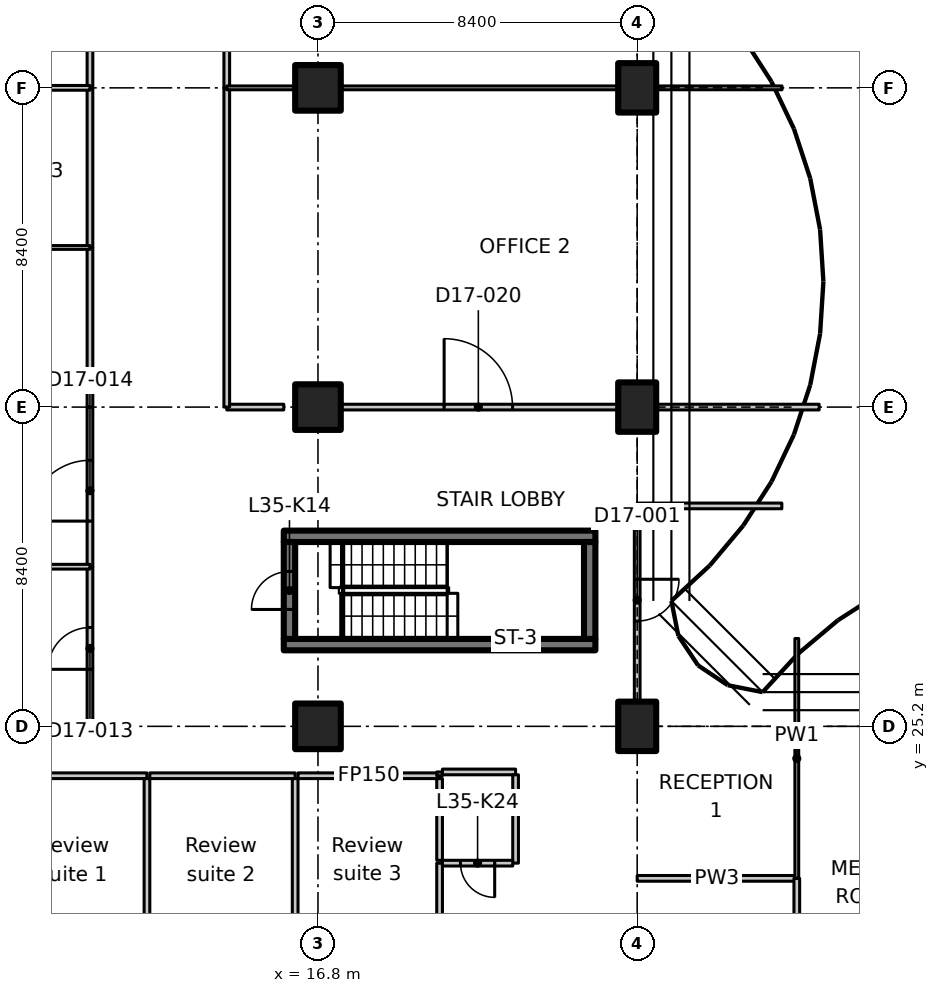
"""IFC4 building model, lengths in metres.
Left out: names, types, materials, properties, quantities, classifications, styles, units other than length and angle.
Written with IfcOpenShell. Run it as: python <this file> out.ifc"""

import sys

from ifc_helpers import new_model, si_unit, direction, frame, frame_2d, origin, origin_2d, place, context, subcontext, project, spatial, polyline, rectangle, outline, extrude, element, fill, save


model = new_model("IFC4")
c1 = context("Model", 3, precision=1e-05, world=origin(), true_north=direction((0.0, 1.0)))
c2 = subcontext(c1, "Body", "Model", "MODEL_VIEW")
j1 = project(units=[si_unit("LENGTHUNIT", "METRE"), si_unit("PLANEANGLEUNIT", "RADIAN")], contexts=[c1])
p1 = place(None, origin())
s1 = spatial("IfcSite", under=j1, at=p1, CompositionType="ELEMENT")
p2 = place(p1, origin())
s2 = spatial("IfcBuilding", under=s1, at=p2, CompositionType="ELEMENT")
p3 = place(p2, frame((0.0, 0.0, 142.1)))
s3 = spatial("IfcBuildingStorey", under=s2, at=p3, CompositionType="ELEMENT", Elevation=142.1)
for number, where, z_axis, x_axis in (
    (1, (16.8, 25.2, 0.0), (0.0, 0.0, 1.0), (1.0, 0.0, 0.0)),
    (2, (16.8, 33.6, 0.0), (0.0, 0.0, 1.0), (1.0, 0.0, 0.0)),
    (3, (16.8, 42.0, 0.0), (0.0, 0.0, 1.0), (1.0, 0.0, 0.0)),
):
    element("IfcColumn", number, at=place(p3, frame(where, z_axis=z_axis, x_axis=x_axis)), inside=s3, PredefinedType="COLUMN", context=c2, shape_type="SweptSolid", body=[
        extrude(rectangle(XDim=1.2, YDim=1.2, at=origin_2d()), origin(), (0.0, 0.0, 1.0), 3.35),
    ])
for number, where, z_axis, x_axis in (
    (4, (25.2, 25.2, 0.0), (0.0, 0.0, 1.0), (1.0, 0.0, 0.0)),
    (5, (25.2, 33.6, 0.0), (0.0, 0.0, 1.0), (1.0, 0.0, 0.0)),
    (6, (25.2, 42.0, 0.0), (0.0, 0.0, 1.0), (1.0, 0.0, 0.0)),
):
    element("IfcColumn", number, at=place(p3, frame(where, z_axis=z_axis, x_axis=x_axis)), inside=s3, PredefinedType="COLUMN", context=c2, shape_type="SweptSolid", body=[
        extrude(rectangle(XDim=1.0, YDim=1.3, at=origin_2d()), origin(), (0.0, 0.0, 1.0), 3.35),
    ])
for number, where, z_axis, x_axis in (
    (7, (15.9, 27.35, 0.0), (0.0, 0.0, 1.0), (1.0, 0.0, 0.0)),
    (8, (15.9, 30.2, 0.0), (0.0, 0.0, 1.0), (1.0, 0.0, 0.0)),
):
    element("IfcWall", number, at=place(p3, frame(where, z_axis=z_axis, x_axis=x_axis)), inside=s3, PredefinedType="SHEAR", context=c2, shape_type="SweptSolid", body=[
        extrude(rectangle(XDim=8.2, YDim=0.3, at=frame_2d((4.1, 0.0))), origin(), (0.0, 0.0, 1.0), 3.35),
    ])
p4 = place(p3, frame((16.05, 27.5, 0.0), z_axis=(0.0, 0.0, 1.0), x_axis=(0.0, 1.0, 0.0)))
e9 = element("IfcWall", 9, at=p4, inside=s3, PredefinedType="SHEAR", context=c2, shape_type="SweptSolid", body=[
    extrude(rectangle(XDim=2.55, YDim=0.3, at=frame_2d((1.275, 0.0))), origin(), (0.0, 0.0, 1.0), 3.35),
])
p5 = place(p4, frame((0.775, 0.0, 0.0)))
e10 = element("IfcOpeningElement", 10, at=p5, cuts=e9, PredefinedType="OPENING", context=c2, shape_type="SweptSolid", body=[
    extrude(rectangle(XDim=1.0, YDim=2.1, at=frame_2d((0.5, 1.05))), frame((0.0, 0.16, 0.0), z_axis=(0.0, -1.0, 0.0), x_axis=(1.0, 0.0, 0.0)), (0.0, 0.0, 1.0), 0.32),
])
p6 = place(p3, frame((23.95, 27.5, 0.0), z_axis=(0.0, 0.0, 1.0), x_axis=(0.0, 1.0, 0.0)))
e11 = element("IfcWall", 11, at=p6, inside=s3, PredefinedType="SHEAR", context=c2, shape_type="SweptSolid", body=[
    extrude(rectangle(XDim=2.55, YDim=0.3, at=frame_2d((1.275, 0.0))), origin(), (0.0, 0.0, 1.0), 3.35),
])
p7 = place(p3, frame((8.575, 23.9, 0.0), z_axis=(0.0, 0.0, 1.0), x_axis=(1.0, 0.0, 0.0)))
e12 = element("IfcWall", 12, at=p7, inside=s3, PredefinedType="PARTITIONING", context=c2, shape_type="SweptSolid", body=[
    extrude(rectangle(XDim=3.725, YDim=0.15, at=frame_2d((1.863, 0.0))), origin(), (0.0, 0.0, 1.0), 3.35),
])
p8 = place(p3, frame((12.3, 23.825, 0.0), z_axis=(0.0, 0.0, 1.0), x_axis=(0.0, -1.0, 0.0)))
e13 = element("IfcWall", 13, at=p8, inside=s3, PredefinedType="PARTITIONING", context=c2, shape_type="SweptSolid", body=[
    extrude(rectangle(XDim=4.35, YDim=0.15, at=frame_2d((2.175, 0.0))), origin(), (0.0, 0.0, 1.0), 3.35),
])
p9 = place(p3, frame((12.375, 23.9, 0.0), z_axis=(0.0, 0.0, 1.0), x_axis=(1.0, 0.0, 0.0)))
e14 = element("IfcWall", 14, at=p9, inside=s3, PredefinedType="PARTITIONING", context=c2, shape_type="SweptSolid", body=[
    extrude(rectangle(XDim=3.825, YDim=0.15, at=frame_2d((1.913, 0.0))), origin(), (0.0, 0.0, 1.0), 3.35),
])
p10 = place(p3, frame((20.0, 21.6, 0.0), z_axis=(0.0, 0.0, 1.0), x_axis=(0.0, -1.0, 0.0)))
e15 = element("IfcWall", 15, at=p10, inside=s3, PredefinedType="PARTITIONING", context=c2, shape_type="SweptSolid", body=[
    extrude(rectangle(XDim=2.2, YDim=0.15, at=frame_2d((1.1, 0.0))), origin(), (0.0, 0.0, 1.0), 3.35),
])
p11 = place(p3, frame((16.2, 23.825, 0.0), z_axis=(0.0, 0.0, 1.0), x_axis=(0.0, -1.0, 0.0)))
e16 = element("IfcWall", 16, at=p11, inside=s3, PredefinedType="PARTITIONING", context=c2, shape_type="SweptSolid", body=[
    extrude(rectangle(XDim=4.35, YDim=0.15, at=frame_2d((2.175, 0.0))), origin(), (0.0, 0.0, 1.0), 3.35),
])
p12 = place(p3, frame((16.275, 23.9, 0.0), z_axis=(0.0, 0.0, 1.0), x_axis=(1.0, 0.0, 0.0)))
e17 = element("IfcWall", 17, at=p12, inside=s3, PredefinedType="PARTITIONING", context=c2, shape_type="SweptSolid", body=[
    extrude(rectangle(XDim=3.725, YDim=0.15, at=frame_2d((1.863, 0.0))), origin(), (0.0, 0.0, 1.0), 3.35),
])
p13 = place(p3, frame((20.0, 23.9, 0.0), z_axis=(0.0, 0.0, 1.0), x_axis=(0.0, 1.0, 0.0)))
e18 = element("IfcWall", 18, at=p13, inside=s3, PredefinedType="PARTITIONING", context=c2, shape_type="SweptSolid", body=[
    extrude(rectangle(XDim=0.1, YDim=0.15, at=frame_2d((0.05, 0.0))), origin(), (0.0, 0.0, 1.0), 3.35),
])
p14 = place(p3, frame((20.075, 24.0, 0.0), z_axis=(0.0, 0.0, 1.0), x_axis=(1.0, 0.0, 0.0)))
e19 = element("IfcWall", 19, at=p14, inside=s3, PredefinedType="PARTITIONING", context=c2, shape_type="SweptSolid", body=[
    extrude(rectangle(XDim=1.925, YDim=0.15, at=frame_2d((0.962, 0.0))), origin(), (0.0, 0.0, 1.0), 3.35),
])
p15 = place(p3, frame((22.0, 23.925, 0.0), z_axis=(0.0, 0.0, 1.0), x_axis=(0.0, -1.0, 0.0)))
e20 = element("IfcWall", 20, at=p15, inside=s3, PredefinedType="PARTITIONING", context=c2, shape_type="SweptSolid", body=[
    extrude(rectangle(XDim=2.325, YDim=0.15, at=frame_2d((1.163, 0.0))), origin(), (0.0, 0.0, 1.0), 3.35),
])
p16 = place(p3, frame((21.925, 21.6, 0.0), z_axis=(0.0, 0.0, 1.0), x_axis=(-1.0, 0.0, 0.0)))
e21 = element("IfcWall", 21, at=p16, inside=s3, PredefinedType="PARTITIONING", context=c2, shape_type="SweptSolid", body=[
    extrude(rectangle(XDim=1.85, YDim=0.15, at=frame_2d((0.925, 0.0))), origin(), (0.0, 0.0, 1.0), 3.35),
])
p17 = place(p16, frame((0.475, 0.0, 0.0)))
e22 = element("IfcOpeningElement", 22, at=p17, cuts=e21, PredefinedType="OPENING", context=c2, shape_type="SweptSolid", body=[
    extrude(rectangle(XDim=0.9, YDim=2.1, at=frame_2d((0.45, 1.05))), frame((0.0, 0.085, 0.0), z_axis=(0.0, -1.0, 0.0), x_axis=(1.0, 0.0, 0.0)), (0.0, 0.0, 1.0), 0.17),
])
p18 = place(p3, frame((20.0, 21.675, 0.0), z_axis=(0.0, 0.0, 1.0), x_axis=(0.0, 1.0, 0.0)))
e23 = element("IfcWall", 23, at=p18, inside=s3, PredefinedType="PARTITIONING", context=c2, shape_type="SweptSolid", body=[
    extrude(rectangle(XDim=2.15, YDim=0.15, at=frame_2d((1.075, 0.0))), origin(), (0.0, 0.0, 1.0), 3.35),
])
p19 = place(p3, frame((25.2, 21.2, 0.0), z_axis=(0.0, 0.0, 1.0), x_axis=(1.0, 0.0, 0.0)))
e24 = element("IfcWall", 24, at=p19, inside=s3, PredefinedType="PARTITIONING", context=c2, shape_type="SweptSolid", body=[
    extrude(rectangle(XDim=4.2, YDim=0.15, at=frame_2d((2.1, 0.0))), origin(), (0.0, 0.0, 1.0), 3.33),
])
p20 = place(p3, frame((29.4, 21.2, 0.0), z_axis=(0.0, 0.0, 1.0), x_axis=(0.0, -1.0, 0.0)))
e25 = element("IfcWall", 25, at=p20, inside=s3, PredefinedType="PARTITIONING", context=c2, shape_type="SweptSolid", body=[
    extrude(rectangle(XDim=8.2, YDim=0.15, at=frame_2d((4.1, 0.0))), origin(), (0.0, 0.0, 1.0), 3.33),
])
p21 = place(p20, frame((3.3, 0.0, 0.0)))
e26 = element("IfcOpeningElement", 26, at=p21, cuts=e25, PredefinedType="OPENING", context=c2, shape_type="SweptSolid", body=[
    extrude(rectangle(XDim=1.6, YDim=2.1, at=frame_2d((0.8, 1.05))), frame((0.0, 0.085, 0.0), z_axis=(0.0, -1.0, 0.0), x_axis=(1.0, 0.0, 0.0)), (0.0, 0.0, 1.0), 0.17),
])
p22 = place(p3, frame((29.4, 27.511, 0.0), z_axis=(0.0, 0.0, 1.0), x_axis=(0.0, -1.0, 0.0)))
e27 = element("IfcWall", 27, at=p22, inside=s3, PredefinedType="PARTITIONING", context=c2, shape_type="SweptSolid", body=[
    extrude(outline(polyline([(0.0, 0.0), (6.311, 0.0), (6.311, 3.33), (2.761, 3.33), (2.759, 2.98), (1.863, 2.98), (1.861, 3.33), (0.236, 3.33), (0.0, 3.33), (0.0, 0.0)])), frame((0.0, 0.05, 0.0), z_axis=(0.0, -1.0, 0.0), x_axis=(1.0, 0.0, 0.0)), (0.0, 0.0, 1.0), 0.1),
])
p23 = place(p3, frame((25.2, 31.0, 0.0), z_axis=(0.0, 0.0, 1.0), x_axis=(0.0, -1.0, 0.0)))
e28 = element("IfcWall", 28, at=p23, inside=s3, PredefinedType="PARTITIONING", context=c2, shape_type="SweptSolid", body=[
    extrude(outline(polyline([(0.0, 0.0), (5.13, 0.0), (5.13, 2.98), (0.0, 2.98), (0.0, 0.0)])), frame((0.0, 0.075, 0.0), z_axis=(0.0, -1.0, 0.0), x_axis=(1.0, 0.0, 0.0)), (0.0, 0.0, 1.0), 0.15),
])
p24 = place(p23, frame((1.93, 0.0, 0.0)))
e29 = element("IfcOpeningElement", 29, at=p24, cuts=e28, PredefinedType="OPENING", context=c2, shape_type="SweptSolid", body=[
    extrude(rectangle(XDim=1.1, YDim=2.1, at=frame_2d((0.55, 1.05))), frame((0.0, 0.085, 0.0), z_axis=(0.0, -1.0, 0.0), x_axis=(1.0, 0.0, 0.0)), (0.0, 0.0, 1.0), 0.17),
])
p25 = place(p3, frame((25.2, 31.0, 0.0), z_axis=(0.0, 0.0, 1.0), x_axis=(1.0, 0.0, 0.0)))
e30 = element("IfcWall", 30, at=p25, inside=s3, PredefinedType="PARTITIONING", context=c2, shape_type="SweptSolid", body=[
    extrude(rectangle(XDim=3.806, YDim=0.15, at=frame_2d((1.903, 0.0))), origin(), (0.0, 0.0, 1.0), 2.98),
])
p26 = place(p3, frame((10.8, 25.2, 0.0), z_axis=(0.0, 0.0, 1.0), x_axis=(0.0, 1.0, 0.0)))
e31 = element("IfcWall", 31, at=p26, inside=s3, PredefinedType="PARTITIONING", context=c2, shape_type="SweptSolid", body=[
    extrude(rectangle(XDim=4.2, YDim=0.15, at=frame_2d((2.1, 0.0))), origin(), (0.0, 0.0, 1.0), 3.33),
])
p27 = place(p26, frame((1.5, 0.0, 0.0)))
e32 = element("IfcOpeningElement", 32, at=p27, cuts=e31, PredefinedType="OPENING", context=c2, shape_type="SweptSolid", body=[
    extrude(rectangle(XDim=1.1, YDim=2.1, at=frame_2d((0.55, 1.05))), frame((0.0, 0.085, 0.0), z_axis=(0.0, -1.0, 0.0), x_axis=(1.0, 0.0, 0.0)), (0.0, 0.0, 1.0), 0.17),
])
p28 = place(p3, frame((10.8, 29.4, 0.0), z_axis=(0.0, 0.0, 1.0), x_axis=(0.0, 1.0, 0.0)))
e33 = element("IfcWall", 33, at=p28, inside=s3, PredefinedType="PARTITIONING", context=c2, shape_type="SweptSolid", body=[
    extrude(rectangle(XDim=4.2, YDim=0.15, at=frame_2d((2.1, 0.0))), origin(), (0.0, 0.0, 1.0), 3.33),
])
p29 = place(p28, frame((1.2, 0.0, 0.0)))
e34 = element("IfcOpeningElement", 34, at=p29, cuts=e33, PredefinedType="OPENING", context=c2, shape_type="SweptSolid", body=[
    extrude(rectangle(XDim=1.6, YDim=2.1, at=frame_2d((0.8, 1.05))), frame((0.0, 0.085, 0.0), z_axis=(0.0, -1.0, 0.0), x_axis=(1.0, 0.0, 0.0)), (0.0, 0.0, 1.0), 0.17),
])
p30 = place(p3, frame((14.4, 33.6, 0.0), z_axis=(0.0, 0.0, 1.0), x_axis=(1.0, 0.0, 0.0)))
e35 = element("IfcWall", 35, at=p30, inside=s3, PredefinedType="PARTITIONING", context=c2, shape_type="SweptSolid", body=[
    extrude(rectangle(XDim=1.5, YDim=0.15, at=frame_2d((0.75, 0.0))), origin(), (0.0, 0.0, 1.0), 3.33),
])
p31 = place(p3, frame((17.42, 33.6, 0.0), z_axis=(0.0, 0.0, 1.0), x_axis=(1.0, 0.0, 0.0)))
e36 = element("IfcWall", 36, at=p31, inside=s3, PredefinedType="PARTITIONING", context=c2, shape_type="SweptSolid", body=[
    extrude(rectangle(XDim=7.26, YDim=0.15, at=frame_2d((3.63, 0.0))), origin(), (0.0, 0.0, 1.0), 3.33),
])
p32 = place(p31, frame((2.7, 0.0, 0.0)))
e37 = element("IfcOpeningElement", 37, at=p32, cuts=e36, PredefinedType="OPENING", context=c2, shape_type="SweptSolid", body=[
    extrude(rectangle(XDim=1.8, YDim=2.1, at=frame_2d((0.9, 1.05))), frame((0.0, 0.085, 0.0), z_axis=(0.0, -1.0, 0.0), x_axis=(1.0, 0.0, 0.0)), (0.0, 0.0, 1.0), 0.17),
])
p33 = place(p3, frame((25.72, 33.6, 0.0), z_axis=(0.0, 0.0, 1.0), x_axis=(1.0, 0.0, 0.0)))
e38 = element("IfcWall", 38, at=p33, inside=s3, PredefinedType="PARTITIONING", context=c2, shape_type="SweptSolid", body=[
    extrude(rectangle(XDim=4.268, YDim=0.15, at=frame_2d((2.134, 0.0))), origin(), (0.0, 0.0, 1.0), 2.98),
])
for number, where, z_axis, x_axis in (
    (39, (10.8, 33.6, 0.0), (0.0, 0.0, 1.0), (0.0, 1.0, 0.0)),
    (40, (10.8, 37.8, 0.0), (0.0, 0.0, 1.0), (0.0, 1.0, 0.0)),
):
    element("IfcWall", number, at=place(p3, frame(where, z_axis=z_axis, x_axis=x_axis)), inside=s3, PredefinedType="PARTITIONING", context=c2, shape_type="SweptSolid", body=[
        extrude(rectangle(XDim=4.2, YDim=0.15, at=frame_2d((2.1, 0.0))), origin(), (0.0, 0.0, 1.0), 3.33),
    ])
p34 = place(p3, frame((10.8, 42.0, 0.0), z_axis=(0.0, 0.0, 1.0), x_axis=(0.0, 1.0, 0.0)))
e41 = element("IfcWall", 41, at=p34, inside=s3, PredefinedType="PARTITIONING", context=c2, shape_type="SweptSolid", body=[
    extrude(rectangle(XDim=4.2, YDim=0.15, at=frame_2d((2.1, 0.0))), origin(), (0.0, 0.0, 1.0), 3.33),
])
p35 = place(p34, frame((1.5, 0.0, 0.0)))
e42 = element("IfcOpeningElement", 42, at=p35, cuts=e41, PredefinedType="OPENING", context=c2, shape_type="SweptSolid", body=[
    extrude(rectangle(XDim=1.1, YDim=2.1, at=frame_2d((0.55, 1.05))), frame((0.0, 0.085, 0.0), z_axis=(0.0, -1.0, 0.0), x_axis=(1.0, 0.0, 0.0)), (0.0, 0.0, 1.0), 0.17),
])
p36 = place(p3, frame((14.4, 42.0, 0.0), z_axis=(0.0, 0.0, 1.0), x_axis=(0.0, -1.0, 0.0)))
e43 = element("IfcWall", 43, at=p36, inside=s3, PredefinedType="PARTITIONING", context=c2, shape_type="SweptSolid", body=[
    extrude(rectangle(XDim=8.4, YDim=0.15, at=frame_2d((4.2, 0.0))), origin(), (0.0, 0.0, 1.0), 3.33),
])
p37 = place(p3, frame((14.4, 50.4, 0.0), z_axis=(0.0, 0.0, 1.0), x_axis=(0.0, -1.0, 0.0)))
e44 = element("IfcWall", 44, at=p37, inside=s3, PredefinedType="PARTITIONING", context=c2, shape_type="SweptSolid", body=[
    extrude(rectangle(XDim=8.4, YDim=0.15, at=frame_2d((4.2, 0.0))), origin(), (0.0, 0.0, 1.0), 3.33),
])
p38 = place(p37, frame((3.3, 0.0, 0.0)))
e45 = element("IfcOpeningElement", 45, at=p38, cuts=e44, PredefinedType="OPENING", context=c2, shape_type="SweptSolid", body=[
    extrude(rectangle(XDim=1.6, YDim=2.1, at=frame_2d((0.8, 1.05))), frame((0.0, 0.085, 0.0), z_axis=(0.0, -1.0, 0.0), x_axis=(1.0, 0.0, 0.0)), (0.0, 0.0, 1.0), 0.17),
])
p39 = place(p3, frame((-1.1, 29.4, 0.0), z_axis=(0.0, 0.0, 1.0), x_axis=(1.0, 0.0, 0.0)))
e46 = element("IfcWall", 46, at=p39, inside=s3, PredefinedType="PARTITIONING", context=c2, shape_type="SweptSolid", body=[
    extrude(outline(polyline([(0.0, 0.0), (11.9, 0.0), (11.9, 3.33), (1.55, 3.33), (1.548, 2.98), (0.652, 2.98), (0.65, 3.33), (0.0, 3.33), (0.0, 0.0)])), frame((0.0, 0.062, 0.0), z_axis=(0.0, -1.0, 0.0), x_axis=(1.0, 0.0, 0.0)), (0.0, 0.0, 1.0), 0.125),
])
p40 = place(p3, frame((4.426, 37.8, 0.0), z_axis=(0.0, 0.0, 1.0), x_axis=(1.0, 0.0, 0.0)))
e47 = element("IfcWall", 47, at=p40, inside=s3, PredefinedType="PARTITIONING", context=c2, shape_type="SweptSolid", body=[
    extrude(outline(polyline([(0.0, 0.0), (6.374, 0.0), (6.374, 3.33), (1.624, 3.33), (1.622, 2.98), (0.726, 2.98), (0.724, 3.33), (0.074, 3.33), (0.0, 3.33), (0.0, 0.0)])), frame((0.0, 0.05, 0.0), z_axis=(0.0, -1.0, 0.0), x_axis=(1.0, 0.0, 0.0)), (0.0, 0.0, 1.0), 0.1),
])
p41 = place(p40, frame((2.674, 0.0, 0.0)))
e48 = element("IfcOpeningElement", 48, at=p41, cuts=e47, PredefinedType="OPENING", context=c2, shape_type="SweptSolid", body=[
    extrude(rectangle(XDim=1.0, YDim=2.1, at=frame_2d((0.5, 1.05))), frame((0.0, 0.06, 0.0), z_axis=(0.0, -1.0, 0.0), x_axis=(1.0, 0.0, 0.0)), (0.0, 0.0, 1.0), 0.12),
])
p42 = place(p3, frame((9.02, 42.0, 0.0), z_axis=(0.0, 0.0, 1.0), x_axis=(1.0, 0.0, 0.0)))
e49 = element("IfcWall", 49, at=p42, inside=s3, PredefinedType="PARTITIONING", context=c2, shape_type="SweptSolid", body=[
    extrude(rectangle(XDim=1.78, YDim=0.125, at=frame_2d((0.89, 0.0))), origin(), (0.0, 0.0, 1.0), 3.33),
])
p43 = place(p3, frame((14.4, 42.0, 0.0), z_axis=(0.0, 0.0, 1.0), x_axis=(1.0, 0.0, 0.0)))
e50 = element("IfcWall", 50, at=p43, inside=s3, PredefinedType="PARTITIONING", context=c2, shape_type="SweptSolid", body=[
    extrude(rectangle(XDim=1.78, YDim=0.1, at=frame_2d((0.89, 0.0))), origin(), (0.0, 0.0, 1.0), 3.33),
])
p44 = place(p3, frame((17.42, 42.0, 0.0), z_axis=(0.0, 0.0, 1.0), x_axis=(1.0, 0.0, 0.0)))
e51 = element("IfcWall", 51, at=p44, inside=s3, PredefinedType="PARTITIONING", context=c2, shape_type="SweptSolid", body=[
    extrude(rectangle(XDim=7.26, YDim=0.1, at=frame_2d((3.63, 0.0))), origin(), (0.0, 0.0, 1.0), 3.33),
])
p45 = place(p3, frame((25.72, 42.0, 0.0), z_axis=(0.0, 0.0, 1.0), x_axis=(1.0, 0.0, 0.0)))
e52 = element("IfcWall", 52, at=p45, inside=s3, PredefinedType="PARTITIONING", context=c2, shape_type="SweptSolid", body=[
    extrude(rectangle(XDim=3.292, YDim=0.1, at=frame_2d((1.646, 0.0))), origin(), (0.0, 0.0, 1.0), 2.98),
])
p46 = place(p5, origin())
e53 = element("IfcDoor", 53, at=p46, inside=s3, OperationType="SINGLE_SWING_RIGHT", PredefinedType="DOOR", context=c2, shape_type="SweptSolid", body=[
    extrude(rectangle(XDim=1.0, YDim=2.1, at=frame_2d((0.5, 1.05))), frame((0.0, 0.025, 0.0), z_axis=(0.0, -1.0, 0.0), x_axis=(1.0, 0.0, 0.0)), (0.0, 0.0, 1.0), 0.05),
])
fill(e10, e53)
p47 = place(p17, origin())
e54 = element("IfcDoor", 54, at=p47, inside=s3, OperationType="SINGLE_SWING_RIGHT", PredefinedType="DOOR", context=c2, shape_type="SweptSolid", body=[
    extrude(rectangle(XDim=0.9, YDim=2.1, at=frame_2d((0.45, 1.05))), frame((0.0, 0.025, 0.0), z_axis=(0.0, -1.0, 0.0), x_axis=(1.0, 0.0, 0.0)), (0.0, 0.0, 1.0), 0.05),
])
fill(e22, e54)
p48 = place(p24, origin())
e55 = element("IfcDoor", 55, at=p48, inside=s3, OperationType="SINGLE_SWING_RIGHT", PredefinedType="DOOR", context=c2, shape_type="SweptSolid", body=[
    extrude(rectangle(XDim=1.1, YDim=2.1, at=frame_2d((0.55, 1.05))), frame((0.0, 0.025, 0.0), z_axis=(0.0, -1.0, 0.0), x_axis=(1.0, 0.0, 0.0)), (0.0, 0.0, 1.0), 0.05),
])
fill(e29, e55)
p49 = place(p27, origin())
e56 = element("IfcDoor", 56, at=p49, inside=s3, OperationType="SINGLE_SWING_LEFT", PredefinedType="DOOR", context=c2, shape_type="SweptSolid", body=[
    extrude(rectangle(XDim=1.1, YDim=2.1, at=frame_2d((0.55, 1.05))), frame((0.0, 0.025, 0.0), z_axis=(0.0, -1.0, 0.0), x_axis=(1.0, 0.0, 0.0)), (0.0, 0.0, 1.0), 0.05),
])
fill(e32, e56)
p50 = place(p29, origin())
e57 = element("IfcDoor", 57, at=p50, inside=s3, OperationType="DOUBLE_DOOR_SINGLE_SWING", PredefinedType="DOOR", context=c2, shape_type="SweptSolid", body=[
    extrude(rectangle(XDim=1.6, YDim=2.1, at=frame_2d((0.8, 1.05))), frame((0.0, 0.025, 0.0), z_axis=(0.0, -1.0, 0.0), x_axis=(1.0, 0.0, 0.0)), (0.0, 0.0, 1.0), 0.05),
])
fill(e34, e57)
p51 = place(p32, origin())
e58 = element("IfcDoor", 58, at=p51, inside=s3, OperationType="DOUBLE_DOOR_SINGLE_SWING", PredefinedType="DOOR", context=c2, shape_type="SweptSolid", body=[
    extrude(rectangle(XDim=1.8, YDim=2.1, at=frame_2d((0.9, 1.05))), frame((0.0, 0.025, 0.0), z_axis=(0.0, -1.0, 0.0), x_axis=(1.0, 0.0, 0.0)), (0.0, 0.0, 1.0), 0.05),
])
fill(e37, e58)
save(model, sys.argv[1])
